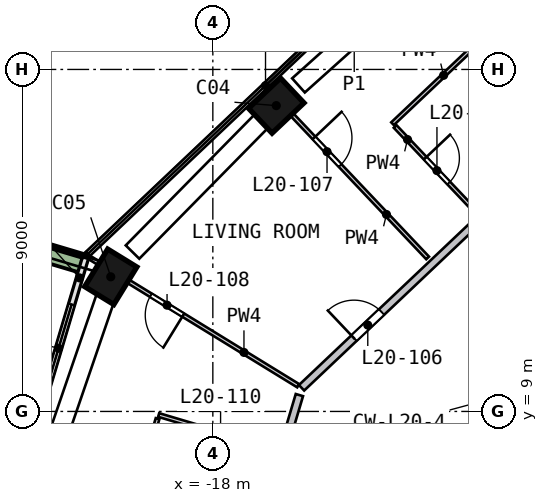
"""IFC4 building model, lengths in metres.
Left out: names, types, materials, properties, quantities, classifications, styles, units other than length and angle.
Written with IfcOpenShell. Run it as: python <this file> out.ifc"""

import sys

from ifc_helpers import new_model, si_unit, direction, frame, frame_2d, origin, origin_2d, place, context, subcontext, project, spatial, polyline, rectangle, outline, extrude, element, fill, save


model = new_model("IFC4")
c1 = context("Model", 3, precision=1e-05, world=origin(), true_north=direction((0.0, 1.0)))
c2 = subcontext(c1, "Body", "Model", "MODEL_VIEW")
j1 = project(units=[si_unit("LENGTHUNIT", "METRE"), si_unit("PLANEANGLEUNIT", "RADIAN")], contexts=[c1])
p1 = place(None, origin())
s1 = spatial("IfcSite", under=j1, at=p1, CompositionType="ELEMENT")
p2 = place(p1, origin())
s2 = spatial("IfcBuilding", under=s1, at=p2, CompositionType="ELEMENT")
p3 = place(p2, frame((0.0, 0.0, 89.5)))
s3 = spatial("IfcBuildingStorey", under=s2, at=p3, CompositionType="ELEMENT", Elevation=89.5)
p4 = place(p3, frame((-16.233, 17.142, 0.0), z_axis=(-0.080917572, -0.077875558, 0.993673862), x_axis=(-0.721783867, -0.682947062, -0.112300308)))
e1 = element("IfcColumn", 1, at=p4, inside=s3, PredefinedType="COLUMN", context=c2, shape_type="SweptSolid", body=[
    extrude(rectangle(XDim=1.15, YDim=0.9, at=origin_2d()), origin(), (0.0, 0.0, 1.0), 3.21),
])
p5 = place(p3, frame((-20.615, 12.662, 0.0), z_axis=(-0.059376626, -0.098530227, 0.993361068), x_axis=(0.51992525, 0.846430674, 0.115034117)))
e2 = element("IfcColumn", 2, at=p5, inside=s3, PredefinedType="COLUMN", context=c2, shape_type="SweptSolid", body=[
    extrude(rectangle(XDim=1.15, YDim=0.9, at=origin_2d()), origin(), (0.0, 0.0, 1.0), 3.211),
])
p6 = place(p3, frame((-5.516, 13.717, 0.0), z_axis=(0.0, 0.0, 1.0), x_axis=(-0.707106781, -0.707106781, 0.0)))
e3 = element("IfcWall", 3, at=p6, inside=s3, PredefinedType="SHEAR", context=c2, shape_type="SweptSolid", body=[
    extrude(rectangle(XDim=11.598, YDim=0.8, at=frame_2d((5.799, 0.0))), origin(), (0.0, 0.0, 1.0), 3.5),
])
p7 = place(p3, frame((-21.356, 13.027, 0.0), z_axis=(0.0, 0.0, 1.0), x_axis=(-0.285017959, -0.958522177, 0.0)))
e4 = element("IfcWall", 4, at=p7, inside=s3, PredefinedType="SOLIDWALL", context=c2, shape_type="SweptSolid", body=[
    extrude(rectangle(XDim=4.068, YDim=0.15, at=frame_2d((2.034, 0.0))), origin(), (0.0, 0.0, 1.0), 2.425),
])
p8 = place(p7, frame((1.268, 0.0, 0.0)))
e5 = element("IfcOpeningElement", 5, at=p8, cuts=e4, PredefinedType="OPENING", context=c2, shape_type="SweptSolid", body=[
    extrude(rectangle(XDim=2.4, YDim=2.4, at=frame_2d((1.2, 1.2))), frame((0.0, 0.085, 0.0), z_axis=(0.0, -1.0, 0.0), x_axis=(1.0, 0.0, 0.0)), (0.0, 0.0, 1.0), 0.17),
])
p9 = place(p3, frame((-21.472, 12.905, 0.0), z_axis=(0.0, 0.0, 1.0), x_axis=(-0.958516635, 0.285036595, 0.0)))
e6 = element("IfcWall", 6, at=p9, inside=s3, PredefinedType="SOLIDWALL", context=c2, shape_type="SweptSolid", body=[
    extrude(rectangle(XDim=3.199, YDim=0.5, at=frame_2d((1.6, 0.0))), origin(), (0.0, 0.0, 1.0), 0.7),
])
p10 = place(p3, origin())
e7 = element("IfcWall", 7, at=p10, inside=s3, PredefinedType="SOLIDWALL", context=c2, shape_type="SweptSolid", body=[
    extrude(outline(polyline([(-11.314, 7.354), (-9.405, 9.263), (-9.192, 9.051), (-10.96, 7.283), (-8.874, 5.197), (-9.016, 5.056), (-11.314, 7.354)])), origin(), (0.0, 0.0, 1.0), 3.19),
])
p11 = place(p3, frame((-18.321, 0.693, 0.0), z_axis=(0.0, 0.0, 1.0), x_axis=(0.28503012, 0.95851856, 0.0)))
e8 = element("IfcWall", 8, at=p11, inside=s3, PredefinedType="SOLIDWALL", context=c2, shape_type="SweptSolid", body=[
    extrude(rectangle(XDim=9.116, YDim=0.2, at=frame_2d((4.558, 0.0))), origin(), (0.0, 0.0, 1.0), 3.19),
])
p12 = place(p11, frame((0.2, 0.0, 0.0)))
e9 = element("IfcOpeningElement", 9, at=p12, cuts=e8, PredefinedType="OPENING", context=c2, shape_type="SweptSolid", body=[
    extrude(rectangle(XDim=1.0, YDim=2.1, at=frame_2d((0.5, 1.05))), frame((0.0, 0.11, 0.0), z_axis=(0.0, -1.0, 0.0), x_axis=(1.0, 0.0, 0.0)), (0.0, 0.0, 1.0), 0.22),
])
p13 = place(p3, frame((-15.666, 9.622, 0.0), z_axis=(0.0, 0.0, 1.0), x_axis=(0.726079372, 0.687610897, 0.0)))
e10 = element("IfcWall", 10, at=p13, inside=s3, PredefinedType="SOLIDWALL", context=c2, shape_type="SweptSolid", body=[
    extrude(rectangle(XDim=9.317, YDim=0.2, at=frame_2d((4.658, 0.0))), origin(), (0.0, 0.0, 1.0), 3.19),
])
p14 = place(p13, frame((1.9, 0.0, 0.0)))
e11 = element("IfcOpeningElement", 11, at=p14, cuts=e10, PredefinedType="OPENING", context=c2, shape_type="SweptSolid", body=[
    extrude(rectangle(XDim=1.0, YDim=2.1, at=frame_2d((0.5, 1.05))), frame((0.0, 0.11, 0.0), z_axis=(0.0, -1.0, 0.0), x_axis=(1.0, 0.0, 0.0)), (0.0, 0.0, 1.0), 0.22),
])
p15 = place(p3, frame((-19.454, 8.81, 0.0), z_axis=(0.0, 0.0, 1.0), x_axis=(-0.284999457, -0.958527678, 0.0)))
e12 = element("IfcWall", 12, at=p15, inside=s3, PredefinedType="PARTITIONING", context=c2, shape_type="SweptSolid", body=[
    extrude(rectangle(XDim=2.7, YDim=0.1, at=frame_2d((1.35, 0.0))), origin(), (0.0, 0.0, 1.0), 3.19),
])
p16 = place(p3, frame((-15.754, 9.677, 0.0), z_axis=(0.0, 0.0, 1.0), x_axis=(-0.852094241, 0.523388388, 0.0)))
e13 = element("IfcWall", 13, at=p16, inside=s3, PredefinedType="PARTITIONING", context=c2, shape_type="SweptSolid", body=[
    extrude(rectangle(XDim=6.476, YDim=0.1, at=frame_2d((3.238, 0.0))), origin(), (0.0, 0.0, 1.0), 3.19),
])
p17 = place(p16, frame((3.55, 0.0, 0.0)))
e14 = element("IfcOpeningElement", 14, at=p17, cuts=e13, PredefinedType="OPENING", context=c2, shape_type="SweptSolid", body=[
    extrude(rectangle(XDim=1.0, YDim=2.1, at=frame_2d((0.5, 1.05))), frame((0.0, 0.06, 0.0), z_axis=(0.0, -1.0, 0.0), x_axis=(1.0, 0.0, 0.0)), (0.0, 0.0, 1.0), 0.12),
])
p18 = place(p3, frame((-16.358, 7.994, 0.0), z_axis=(0.0, 0.0, 1.0), x_axis=(-0.958520585, 0.285023313, 0.0)))
e15 = element("IfcWall", 15, at=p18, inside=s3, PredefinedType="PARTITIONING", context=c2, shape_type="SweptSolid", body=[
    extrude(rectangle(XDim=3.2, YDim=0.1, at=frame_2d((1.6, 0.0))), origin(), (0.0, 0.0, 1.0), 3.19),
])
p19 = place(p18, frame((1.05, 0.0, 0.0)))
e16 = element("IfcOpeningElement", 16, at=p19, cuts=e15, PredefinedType="OPENING", context=c2, shape_type="SweptSolid", body=[
    extrude(rectangle(XDim=0.9, YDim=2.1, at=frame_2d((0.45, 1.05))), frame((0.0, 0.06, 0.0), z_axis=(0.0, -1.0, 0.0), x_axis=(1.0, 0.0, 0.0)), (0.0, 0.0, 1.0), 0.12),
])
p20 = place(p3, frame((-16.577, 17.505, 0.0), z_axis=(0.0, 0.0, 1.0), x_axis=(0.687611401, -0.726078894, 0.0)))
e17 = element("IfcWall", 17, at=p20, inside=s3, PredefinedType="PARTITIONING", context=c2, shape_type="SweptSolid", body=[
    extrude(rectangle(XDim=6.15, YDim=0.1, at=frame_2d((3.075, 0.0))), origin(), (0.0, 0.0, 1.0), 3.19),
])
p21 = place(p20, frame((1.8, 0.0, 0.0)))
e18 = element("IfcOpeningElement", 18, at=p21, cuts=e17, PredefinedType="OPENING", context=c2, shape_type="SweptSolid", body=[
    extrude(rectangle(XDim=1.0, YDim=2.1, at=frame_2d((0.5, 1.05))), frame((0.0, 0.06, 0.0), z_axis=(0.0, -1.0, 0.0), x_axis=(1.0, 0.0, 0.0)), (0.0, 0.0, 1.0), 0.12),
])
p22 = place(p3, frame((-13.203, 16.5, 0.0), z_axis=(0.0, 0.0, 1.0), x_axis=(0.687589541, -0.726099596, 0.0)))
e19 = element("IfcWall", 19, at=p22, inside=s3, PredefinedType="PARTITIONING", context=c2, shape_type="SweptSolid", body=[
    extrude(rectangle(XDim=3.1, YDim=0.1, at=frame_2d((1.55, 0.0))), origin(), (0.0, 0.0, 1.0), 3.19),
])
p23 = place(p22, frame((1.15, 0.0, 0.0)))
e20 = element("IfcOpeningElement", 20, at=p23, cuts=e19, PredefinedType="OPENING", context=c2, shape_type="SweptSolid", body=[
    extrude(rectangle(XDim=0.9, YDim=2.1, at=frame_2d((0.45, 1.05))), frame((0.0, 0.06, 0.0), z_axis=(0.0, -1.0, 0.0), x_axis=(1.0, 0.0, 0.0)), (0.0, 0.0, 1.0), 0.12),
])
p24 = place(p3, frame((-10.582, 19.119, 0.0), z_axis=(0.0, 0.0, 1.0), x_axis=(-0.726060065, -0.687631284, 0.0)))
e21 = element("IfcWall", 21, at=p24, inside=s3, PredefinedType="PARTITIONING", context=c2, shape_type="SweptSolid", body=[
    extrude(rectangle(XDim=3.704, YDim=0.1, at=frame_2d((1.852, 0.0))), origin(), (0.0, 0.0, 1.0), 3.19),
])
p25 = place(p8, origin())
e22 = element("IfcDoor", 22, at=p25, inside=s3, OperationType="SLIDING_TO_LEFT", PredefinedType="DOOR", context=c2, shape_type="SweptSolid", body=[
    extrude(rectangle(XDim=2.4, YDim=2.4, at=frame_2d((1.2, 1.2))), frame((0.0, 0.025, 0.0), z_axis=(0.0, -1.0, 0.0), x_axis=(1.0, 0.0, 0.0)), (0.0, 0.0, 1.0), 0.05),
])
fill(e5, e22)
p26 = place(p14, origin())
e23 = element("IfcDoor", 23, at=p26, inside=s3, OperationType="SINGLE_SWING_LEFT", PredefinedType="DOOR", context=c2, shape_type="SweptSolid", body=[
    extrude(rectangle(XDim=1.0, YDim=2.1, at=frame_2d((0.5, 1.05))), frame((0.0, 0.025, 0.0), z_axis=(0.0, -1.0, 0.0), x_axis=(1.0, 0.0, 0.0)), (0.0, 0.0, 1.0), 0.05),
])
fill(e11, e23)
p27 = place(p21, origin())
e24 = element("IfcDoor", 24, at=p27, inside=s3, OperationType="SINGLE_SWING_LEFT", PredefinedType="DOOR", context=c2, shape_type="SweptSolid", body=[
    extrude(rectangle(XDim=1.0, YDim=2.1, at=frame_2d((0.5, 1.05))), frame((0.0, 0.025, 0.0), z_axis=(0.0, -1.0, 0.0), x_axis=(1.0, 0.0, 0.0)), (0.0, 0.0, 1.0), 0.05),
])
fill(e18, e24)
p28 = place(p17, origin())
e25 = element("IfcDoor", 25, at=p28, inside=s3, OperationType="SINGLE_SWING_LEFT", PredefinedType="DOOR", context=c2, shape_type="SweptSolid", body=[
    extrude(rectangle(XDim=1.0, YDim=2.1, at=frame_2d((0.5, 1.05))), frame((0.0, 0.025, 0.0), z_axis=(0.0, -1.0, 0.0), x_axis=(1.0, 0.0, 0.0)), (0.0, 0.0, 1.0), 0.05),
])
fill(e14, e25)
p29 = place(p23, origin())
e26 = element("IfcDoor", 26, at=p29, inside=s3, OperationType="SINGLE_SWING_LEFT", PredefinedType="DOOR", context=c2, shape_type="SweptSolid", body=[
    extrude(rectangle(XDim=0.9, YDim=2.1, at=frame_2d((0.45, 1.05))), frame((0.0, 0.025, 0.0), z_axis=(0.0, -1.0, 0.0), x_axis=(1.0, 0.0, 0.0)), (0.0, 0.0, 1.0), 0.05),
])
fill(e20, e26)
save(model, sys.argv[1])
